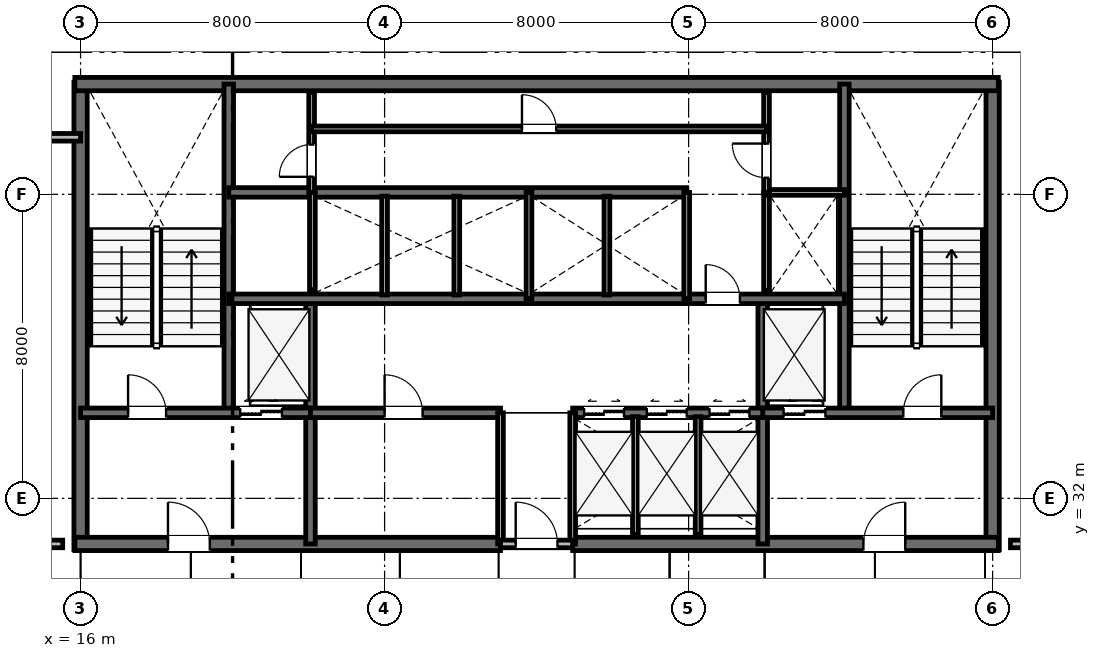
"""IFC4 building model, lengths in metres.
Left out: names, types, materials, properties, quantities, classifications, styles, units other than length and angle.
Written with IfcOpenShell. Run it as: python <this file> out.ifc"""

import sys

from ifc_helpers import new_model, si_unit, direction, frame, frame_2d, origin, place, context, subcontext, project, spatial, rectangle, extrude, element, fill, save


model = new_model("IFC4")
c1 = context("Model", 3, precision=1e-05, world=origin(), true_north=direction((0.0, 1.0)))
c2 = subcontext(c1, "Body", "Model", "MODEL_VIEW")
j1 = project(units=[si_unit("LENGTHUNIT", "METRE"), si_unit("PLANEANGLEUNIT", "RADIAN")], contexts=[c1])
p1 = place(None, origin())
s1 = spatial("IfcSite", under=j1, at=p1, CompositionType="ELEMENT")
p2 = place(p1, origin())
s2 = spatial("IfcBuilding", under=s1, at=p2, CompositionType="ELEMENT")
p3 = place(p2, frame((0.0, 0.0, 122.4)))
s3 = spatial("IfcBuildingStorey", under=s2, at=p3, CompositionType="ELEMENT", Elevation=122.4)
for number, where, z_axis, x_axis in (
    (1, (16.0, 30.65, 0.0), (0.0, 0.0, 1.0), (0.0, 1.0, 0.0)),
    (2, (40.0, 30.65, 0.0), (0.0, 0.0, 1.0), (0.0, 1.0, 0.0)),
):
    element("IfcWall", number, at=place(p3, frame(where, z_axis=z_axis, x_axis=x_axis)), inside=s3, PredefinedType="SHEAR", context=c2, shape_type="SweptSolid", body=[
        extrude(rectangle(XDim=12.3, YDim=0.35, at=frame_2d((6.15, 0.0))), origin(), (0.0, 0.0, 1.0), 3.6),
    ])
p4 = place(p3, frame((15.85, 42.9, 0.0), z_axis=(0.0, 0.0, 1.0), x_axis=(1.0, 0.0, 0.0)))
e3 = element("IfcWall", 3, at=p4, inside=s3, PredefinedType="SHEAR", context=c2, shape_type="SweptSolid", body=[
    extrude(rectangle(XDim=24.3, YDim=0.35, at=frame_2d((12.15, 0.0))), origin(), (0.0, 0.0, 1.0), 3.6),
])
p5 = place(p3, frame((15.85, 30.8, 0.0), z_axis=(0.0, 0.0, 1.0), x_axis=(1.0, 0.0, 0.0)))
e4 = element("IfcWall", 4, at=p5, inside=s3, PredefinedType="SHEAR", context=c2, shape_type="SweptSolid", body=[
    extrude(rectangle(XDim=11.2, YDim=0.35, at=frame_2d((5.6, 0.0))), origin(), (0.0, 0.0, 1.0), 3.6),
])
p6 = place(p5, frame((2.45, 0.0, 0.0)))
e5 = element("IfcOpeningElement", 5, at=p6, cuts=e4, PredefinedType="OPENING", context=c2, shape_type="SweptSolid", body=[
    extrude(rectangle(XDim=1.1, YDim=2.15, at=frame_2d((0.55, 1.075))), frame((0.0, 0.185, 0.0), z_axis=(0.0, -1.0, 0.0), x_axis=(1.0, 0.0, 0.0)), (0.0, 0.0, 1.0), 0.37),
])
p7 = place(p3, frame((28.95, 30.8, 0.0), z_axis=(0.0, 0.0, 1.0), x_axis=(1.0, 0.0, 0.0)))
e6 = element("IfcWall", 6, at=p7, inside=s3, PredefinedType="SHEAR", context=c2, shape_type="SweptSolid", body=[
    extrude(rectangle(XDim=11.2, YDim=0.35, at=frame_2d((5.6, 0.0))), origin(), (0.0, 0.0, 1.0), 3.6),
])
p8 = place(p7, frame((7.65, 0.0, 0.0)))
e7 = element("IfcOpeningElement", 7, at=p8, cuts=e6, PredefinedType="OPENING", context=c2, shape_type="SweptSolid", body=[
    extrude(rectangle(XDim=1.1, YDim=2.15, at=frame_2d((0.55, 1.075))), frame((0.0, 0.185, 0.0), z_axis=(0.0, -1.0, 0.0), x_axis=(1.0, 0.0, 0.0)), (0.0, 0.0, 1.0), 0.37),
])
for number, where, z_axis, x_axis in (
    (8, (19.9, 34.25, 0.0), (0.0, 0.0, 1.0), (0.0, 1.0, 0.0)),
    (9, (36.1, 34.25, 0.0), (0.0, 0.0, 1.0), (0.0, 1.0, 0.0)),
):
    element("IfcWall", number, at=place(p3, frame(where, z_axis=z_axis, x_axis=x_axis)), inside=s3, PredefinedType="SHEAR", context=c2, shape_type="SweptSolid", body=[
        extrude(rectangle(XDim=8.65, YDim=0.25, at=frame_2d((4.325, 0.0))), origin(), (0.0, 0.0, 1.0), 3.6),
    ])
for number, where, z_axis, x_axis in (
    (10, (22.05, 30.8, 0.0), (0.0, 0.0, 1.0), (0.0, 1.0, 0.0)),
    (11, (33.95, 30.8, 0.0), (0.0, 0.0, 1.0), (0.0, 1.0, 0.0)),
):
    element("IfcWall", number, at=place(p3, frame(where, z_axis=z_axis, x_axis=x_axis)), inside=s3, PredefinedType="SHEAR", context=c2, shape_type="SweptSolid", body=[
        extrude(rectangle(XDim=6.45, YDim=0.25, at=frame_2d((3.225, 0.0))), origin(), (0.0, 0.0, 1.0), 3.6),
    ])
p9 = place(p3, frame((16.0, 34.25, 0.0), z_axis=(0.0, 0.0, 1.0), x_axis=(1.0, 0.0, 0.0)))
e12 = element("IfcWall", 12, at=p9, inside=s3, PredefinedType="SHEAR", context=c2, shape_type="SweptSolid", body=[
    extrude(rectangle(XDim=6.05, YDim=0.25, at=frame_2d((3.025, 0.0))), origin(), (0.0, 0.0, 1.0), 3.6),
])
p10 = place(p9, frame((1.25, 0.0, 0.0)))
e13 = element("IfcOpeningElement", 13, at=p10, cuts=e12, PredefinedType="OPENING", context=c2, shape_type="SweptSolid", body=[
    extrude(rectangle(XDim=1.0, YDim=2.15, at=frame_2d((0.5, 1.075))), frame((0.0, 0.135, 0.0), z_axis=(0.0, -1.0, 0.0), x_axis=(1.0, 0.0, 0.0)), (0.0, 0.0, 1.0), 0.27),
])
p11 = place(p9, frame((4.2, 0.0, 0.0)))
e14 = element("IfcOpeningElement", 14, at=p11, cuts=e12, PredefinedType="OPENING", context=c2, shape_type="SweptSolid", body=[
    extrude(rectangle(XDim=1.1, YDim=2.15, at=frame_2d((0.55, 1.075))), frame((0.0, 0.135, 0.0), z_axis=(0.0, -1.0, 0.0), x_axis=(1.0, 0.0, 0.0)), (0.0, 0.0, 1.0), 0.27),
])
p12 = place(p3, frame((33.95, 34.25, 0.0), z_axis=(0.0, 0.0, 1.0), x_axis=(1.0, 0.0, 0.0)))
e15 = element("IfcWall", 15, at=p12, inside=s3, PredefinedType="SHEAR", context=c2, shape_type="SweptSolid", body=[
    extrude(rectangle(XDim=6.05, YDim=0.25, at=frame_2d((3.025, 0.0))), origin(), (0.0, 0.0, 1.0), 3.6),
])
p13 = place(p12, frame((3.7, 0.0, 0.0)))
e16 = element("IfcOpeningElement", 16, at=p13, cuts=e15, PredefinedType="OPENING", context=c2, shape_type="SweptSolid", body=[
    extrude(rectangle(XDim=1.0, YDim=2.15, at=frame_2d((0.5, 1.075))), frame((0.0, 0.135, 0.0), z_axis=(0.0, -1.0, 0.0), x_axis=(1.0, 0.0, 0.0)), (0.0, 0.0, 1.0), 0.27),
])
p14 = place(p12, frame((0.55, 0.0, 0.0)))
e17 = element("IfcOpeningElement", 17, at=p14, cuts=e15, PredefinedType="OPENING", context=c2, shape_type="SweptSolid", body=[
    extrude(rectangle(XDim=1.1, YDim=2.15, at=frame_2d((0.55, 1.075))), frame((0.0, 0.135, 0.0), z_axis=(0.0, -1.0, 0.0), x_axis=(1.0, 0.0, 0.0)), (0.0, 0.0, 1.0), 0.27),
])
p15 = place(p3, frame((22.05, 34.25, 0.0), z_axis=(0.0, 0.0, 1.0), x_axis=(1.0, 0.0, 0.0)))
e18 = element("IfcWall", 18, at=p15, inside=s3, PredefinedType="SHEAR", context=c2, shape_type="SweptSolid", body=[
    extrude(rectangle(XDim=5.0, YDim=0.25, at=frame_2d((2.5, 0.0))), origin(), (0.0, 0.0, 1.0), 3.6),
])
p16 = place(p15, frame((1.95, 0.0, 0.0)))
e19 = element("IfcOpeningElement", 19, at=p16, cuts=e18, PredefinedType="OPENING", context=c2, shape_type="SweptSolid", body=[
    extrude(rectangle(XDim=1.0, YDim=2.15, at=frame_2d((0.5, 1.075))), frame((0.0, 0.135, 0.0), z_axis=(0.0, -1.0, 0.0), x_axis=(1.0, 0.0, 0.0)), (0.0, 0.0, 1.0), 0.27),
])
p17 = place(p3, frame((28.95, 34.25, 0.0), z_axis=(0.0, 0.0, 1.0), x_axis=(1.0, 0.0, 0.0)))
e20 = element("IfcWall", 20, at=p17, inside=s3, PredefinedType="SHEAR", context=c2, shape_type="SweptSolid", body=[
    extrude(rectangle(XDim=5.0, YDim=0.25, at=frame_2d((2.5, 0.0))), origin(), (0.0, 0.0, 1.0), 3.6),
])
p18 = place(p17, frame((0.3, 0.0, 0.0)))
e21 = element("IfcOpeningElement", 21, at=p18, cuts=e20, PredefinedType="OPENING", context=c2, shape_type="SweptSolid", body=[
    extrude(rectangle(XDim=1.05, YDim=2.15, at=frame_2d((0.525, 1.075))), frame((0.0, 0.135, 0.0), z_axis=(0.0, -1.0, 0.0), x_axis=(1.0, 0.0, 0.0)), (0.0, 0.0, 1.0), 0.27),
])
p19 = place(p17, frame((1.95, 0.0, 0.0)))
e22 = element("IfcOpeningElement", 22, at=p19, cuts=e20, PredefinedType="OPENING", context=c2, shape_type="SweptSolid", body=[
    extrude(rectangle(XDim=1.05, YDim=2.15, at=frame_2d((0.525, 1.075))), frame((0.0, 0.135, 0.0), z_axis=(0.0, -1.0, 0.0), x_axis=(1.0, 0.0, 0.0)), (0.0, 0.0, 1.0), 0.27),
])
p20 = place(p17, frame((3.6, 0.0, 0.0)))
e23 = element("IfcOpeningElement", 23, at=p20, cuts=e20, PredefinedType="OPENING", context=c2, shape_type="SweptSolid", body=[
    extrude(rectangle(XDim=1.05, YDim=2.15, at=frame_2d((0.525, 1.075))), frame((0.0, 0.135, 0.0), z_axis=(0.0, -1.0, 0.0), x_axis=(1.0, 0.0, 0.0)), (0.0, 0.0, 1.0), 0.27),
])
p21 = place(p3, frame((19.9, 37.25, 0.0), z_axis=(0.0, 0.0, 1.0), x_axis=(1.0, 0.0, 0.0)))
e24 = element("IfcWall", 24, at=p21, inside=s3, PredefinedType="SHEAR", context=c2, shape_type="SweptSolid", body=[
    extrude(rectangle(XDim=16.2, YDim=0.25, at=frame_2d((8.1, 0.0))), origin(), (0.0, 0.0, 1.0), 3.6),
])
p22 = place(p21, frame((12.55, 0.0, 0.0)))
e25 = element("IfcOpeningElement", 25, at=p22, cuts=e24, PredefinedType="OPENING", context=c2, shape_type="SweptSolid", body=[
    extrude(rectangle(XDim=0.9, YDim=2.15, at=frame_2d((0.45, 1.075))), frame((0.0, 0.135, 0.0), z_axis=(0.0, -1.0, 0.0), x_axis=(1.0, 0.0, 0.0)), (0.0, 0.0, 1.0), 0.27),
])
p23 = place(p3, frame((19.9, 40.05, 0.0), z_axis=(0.0, 0.0, 1.0), x_axis=(1.0, 0.0, 0.0)))
e26 = element("IfcWall", 26, at=p23, inside=s3, PredefinedType="SHEAR", context=c2, shape_type="SweptSolid", body=[
    extrude(rectangle(XDim=12.05, YDim=0.25, at=frame_2d((6.025, 0.0))), origin(), (0.0, 0.0, 1.0), 3.6),
])
p24 = place(p3, frame((27.05, 30.8, 0.0), z_axis=(0.0, 0.0, 1.0), x_axis=(0.0, 1.0, 0.0)))
e27 = element("IfcWall", 27, at=p24, inside=s3, PredefinedType="PLUMBINGWALL", context=c2, shape_type="SweptSolid", body=[
    extrude(rectangle(XDim=3.45, YDim=0.15, at=frame_2d((1.725, 0.0))), origin(), (0.0, 0.0, 1.0), 3.01),
])
p25 = place(p3, frame((28.95, 30.8, 0.0), z_axis=(0.0, 0.0, 1.0), x_axis=(0.0, 1.0, 0.0)))
e28 = element("IfcWall", 28, at=p25, inside=s3, PredefinedType="PLUMBINGWALL", context=c2, shape_type="SweptSolid", body=[
    extrude(rectangle(XDim=3.45, YDim=0.15, at=frame_2d((1.725, 0.0))), origin(), (0.0, 0.0, 1.0), 3.33),
])
p26 = place(p3, frame((27.05, 30.8, 0.0), z_axis=(0.0, 0.0, 1.0), x_axis=(1.0, 0.0, 0.0)))
e29 = element("IfcWall", 29, at=p26, inside=s3, PredefinedType="PARTITIONING", context=c2, shape_type="SweptSolid", body=[
    extrude(rectangle(XDim=1.9, YDim=0.2, at=frame_2d((0.95, 0.0))), origin(), (0.0, 0.0, 1.0), 3.01),
])
p27 = place(p26, frame((0.4, 0.0, 0.0)))
e30 = element("IfcOpeningElement", 30, at=p27, cuts=e29, PredefinedType="OPENING", context=c2, shape_type="SweptSolid", body=[
    extrude(rectangle(XDim=1.1, YDim=2.15, at=frame_2d((0.55, 1.075))), frame((0.0, 0.11, 0.0), z_axis=(0.0, -1.0, 0.0), x_axis=(1.0, 0.0, 0.0)), (0.0, 0.0, 1.0), 0.22),
])
for number, where, z_axis, x_axis in (
    (31, (30.6, 31.05, 0.0), (0.0, 0.0, 1.0), (0.0, 1.0, 0.0)),
    (32, (32.25, 31.05, 0.0), (0.0, 0.0, 1.0), (0.0, 1.0, 0.0)),
):
    element("IfcWall", number, at=place(p3, frame(where, z_axis=z_axis, x_axis=x_axis)), inside=s3, PredefinedType="PLUMBINGWALL", context=c2, shape_type="SweptSolid", body=[
        extrude(rectangle(XDim=3.1, YDim=0.15, at=frame_2d((1.55, 0.0))), origin(), (0.0, 0.0, 1.0), 3.33),
    ])
p28 = place(p3, frame((22.1, 37.49, 0.0), z_axis=(0.0, 0.0, 1.0), x_axis=(0.0, 1.0, 0.0)))
e33 = element("IfcWall", 33, at=p28, inside=s3, PredefinedType="PLUMBINGWALL", context=c2, shape_type="SweptSolid", body=[
    extrude(rectangle(XDim=2.56, YDim=0.15, at=frame_2d((1.28, 0.0))), origin(), (0.0, 0.0, 1.0), 3.33),
])
p29 = place(p3, frame((27.8, 37.25, 0.0), z_axis=(0.0, 0.0, 1.0), x_axis=(0.0, 1.0, 0.0)))
e34 = element("IfcWall", 34, at=p29, inside=s3, PredefinedType="PLUMBINGWALL", context=c2, shape_type="SweptSolid", body=[
    extrude(rectangle(XDim=2.8, YDim=0.15, at=frame_2d((1.4, 0.0))), origin(), (0.0, 0.0, 1.0), 3.33),
])
for number, where, z_axis, x_axis in (
    (35, (24.0, 37.35, 0.0), (0.0, 0.0, 1.0), (0.0, 1.0, 0.0)),
    (36, (25.9, 37.35, 0.0), (0.0, 0.0, 1.0), (0.0, 1.0, 0.0)),
):
    element("IfcWall", number, at=place(p3, frame(where, z_axis=z_axis, x_axis=x_axis)), inside=s3, PredefinedType="PLUMBINGWALL", context=c2, shape_type="SweptSolid", body=[
        extrude(rectangle(XDim=2.6, YDim=0.15, at=frame_2d((1.3, 0.0))), origin(), (0.0, 0.0, 1.0), 3.33),
    ])
p30 = place(p3, frame((31.95, 37.25, 0.0), z_axis=(0.0, 0.0, 1.0), x_axis=(0.0, 1.0, 0.0)))
e37 = element("IfcWall", 37, at=p30, inside=s3, PredefinedType="PLUMBINGWALL", context=c2, shape_type="SweptSolid", body=[
    extrude(rectangle(XDim=2.8, YDim=0.15, at=frame_2d((1.4, 0.0))), origin(), (0.0, 0.0, 1.0), 3.33),
])
p31 = place(p3, frame((29.85, 37.35, 0.0), z_axis=(0.0, 0.0, 1.0), x_axis=(0.0, 1.0, 0.0)))
e38 = element("IfcWall", 38, at=p31, inside=s3, PredefinedType="PLUMBINGWALL", context=c2, shape_type="SweptSolid", body=[
    extrude(rectangle(XDim=2.6, YDim=0.15, at=frame_2d((1.3, 0.0))), origin(), (0.0, 0.0, 1.0), 3.33),
])
p32 = place(p3, frame((34.05, 37.473, 0.0), z_axis=(0.0, 0.0, 1.0), x_axis=(0.0, 1.0, 0.0)))
e39 = element("IfcWall", 39, at=p32, inside=s3, PredefinedType="PLUMBINGWALL", context=c2, shape_type="SweptSolid", body=[
    extrude(rectangle(XDim=2.577, YDim=0.15, at=frame_2d((1.288, 0.0))), origin(), (0.0, 0.0, 1.0), 3.33),
])
p33 = place(p3, frame((34.05, 40.05, 0.0), z_axis=(0.0, 0.0, 1.0), x_axis=(1.0, 0.0, 0.0)))
e40 = element("IfcWall", 40, at=p33, inside=s3, PredefinedType="PARTITIONING", context=c2, shape_type="SweptSolid", body=[
    extrude(rectangle(XDim=2.05, YDim=0.15, at=frame_2d((1.025, 0.0))), origin(), (0.0, 0.0, 1.0), 3.33),
])
p34 = place(p3, frame((34.05, 40.05, 0.0), z_axis=(0.0, 0.0, 1.0), x_axis=(0.0, 1.0, 0.0)))
e41 = element("IfcWall", 41, at=p34, inside=s3, PredefinedType="PARTITIONING", context=c2, shape_type="SweptSolid", body=[
    extrude(rectangle(XDim=2.63, YDim=0.15, at=frame_2d((1.315, 0.0))), origin(), (0.0, 0.0, 1.0), 3.33),
])
p35 = place(p34, frame((0.385, 0.0, 0.0)))
e42 = element("IfcOpeningElement", 42, at=p35, cuts=e41, PredefinedType="OPENING", context=c2, shape_type="SweptSolid", body=[
    extrude(rectangle(XDim=0.9, YDim=2.15, at=frame_2d((0.45, 1.075))), frame((0.0, 0.085, 0.0), z_axis=(0.0, -1.0, 0.0), x_axis=(1.0, 0.0, 0.0)), (0.0, 0.0, 1.0), 0.17),
])
p36 = place(p3, frame((22.08, 40.05, 0.0), z_axis=(0.0, 0.0, 1.0), x_axis=(0.0, 1.0, 0.0)))
e43 = element("IfcWall", 43, at=p36, inside=s3, PredefinedType="PARTITIONING", context=c2, shape_type="SweptSolid", body=[
    extrude(rectangle(XDim=2.63, YDim=0.15, at=frame_2d((1.315, 0.0))), origin(), (0.0, 0.0, 1.0), 3.33),
])
p37 = place(p36, frame((0.41, 0.0, 0.0)))
e44 = element("IfcOpeningElement", 44, at=p37, cuts=e43, PredefinedType="OPENING", context=c2, shape_type="SweptSolid", body=[
    extrude(rectangle(XDim=0.85, YDim=2.15, at=frame_2d((0.425, 1.075))), frame((0.0, 0.085, 0.0), z_axis=(0.0, -1.0, 0.0), x_axis=(1.0, 0.0, 0.0)), (0.0, 0.0, 1.0), 0.17),
])
p38 = place(p3, frame((22.08, 41.72, 0.0), z_axis=(0.0, 0.0, 1.0), x_axis=(1.0, 0.0, 0.0)))
e45 = element("IfcWall", 45, at=p38, inside=s3, PredefinedType="PARTITIONING", context=c2, shape_type="SweptSolid", body=[
    extrude(rectangle(XDim=11.97, YDim=0.15, at=frame_2d((5.985, 0.0))), origin(), (0.0, 0.0, 1.0), 3.33),
])
p39 = place(p38, frame((5.535, 0.0, 0.0)))
e46 = element("IfcOpeningElement", 46, at=p39, cuts=e45, PredefinedType="OPENING", context=c2, shape_type="SweptSolid", body=[
    extrude(rectangle(XDim=0.9, YDim=2.15, at=frame_2d((0.45, 1.075))), frame((0.0, 0.085, 0.0), z_axis=(0.0, -1.0, 0.0), x_axis=(1.0, 0.0, 0.0)), (0.0, 0.0, 1.0), 0.17),
])
p40 = place(p3, frame((11.4, 30.8, 0.0), z_axis=(0.0, 0.0, 1.0), x_axis=(1.0, 0.0, 0.0)))
e47 = element("IfcWall", 47, at=p40, inside=s3, PredefinedType="PARTITIONING", context=c2, shape_type="SweptSolid", body=[
    extrude(rectangle(XDim=4.13, YDim=0.2, at=frame_2d((2.065, 0.0))), origin(), (0.0, 0.0, 1.0), 2.87),
])
p41 = place(p3, frame((40.47, 30.8, 0.0), z_axis=(0.0, 0.0, 1.0), x_axis=(1.0, 0.0, 0.0)))
e48 = element("IfcWall", 48, at=p41, inside=s3, PredefinedType="PARTITIONING", context=c2, shape_type="SweptSolid", body=[
    extrude(rectangle(XDim=1.73, YDim=0.2, at=frame_2d((0.865, 0.0))), origin(), (0.0, 0.0, 1.0), 2.87),
])
p42 = place(p3, frame((0.1, 41.5, 0.0), z_axis=(0.0, 0.0, 1.0), x_axis=(1.0, 0.0, 0.0)))
e49 = element("IfcWall", 49, at=p42, inside=s3, PredefinedType="PARTITIONING", context=c2, shape_type="SweptSolid", body=[
    extrude(rectangle(XDim=15.9, YDim=0.2, at=frame_2d((7.95, 0.0))), origin(), (0.0, 0.0, 1.0), 2.87),
])
p43 = place(p42, frame((9.877, 0.0, 0.0)))
e50 = element("IfcOpeningElement", 50, at=p43, cuts=e49, PredefinedType="OPENING", context=c2, shape_type="SweptSolid", body=[
    extrude(rectangle(XDim=0.95, YDim=2.15, at=frame_2d((0.475, 1.075))), frame((0.0, 0.11, 0.0), z_axis=(0.0, -1.0, 0.0), x_axis=(1.0, 0.0, 0.0)), (0.0, 0.0, 1.0), 0.22),
])
p44 = place(p27, origin())
e51 = element("IfcDoor", 51, at=p44, inside=s3, OperationType="SINGLE_SWING_LEFT", PredefinedType="DOOR", context=c2, shape_type="SweptSolid", body=[
    extrude(rectangle(XDim=1.1, YDim=2.15, at=frame_2d((0.55, 1.075))), frame((0.0, 0.025, 0.0), z_axis=(0.0, -1.0, 0.0), x_axis=(1.0, 0.0, 0.0)), (0.0, 0.0, 1.0), 0.05),
])
fill(e30, e51)
p45 = place(p10, origin())
e52 = element("IfcDoor", 52, at=p45, inside=s3, OperationType="SINGLE_SWING_LEFT", PredefinedType="DOOR", context=c2, shape_type="SweptSolid", body=[
    extrude(rectangle(XDim=1.0, YDim=2.15, at=frame_2d((0.5, 1.075))), frame((0.0, 0.025, 0.0), z_axis=(0.0, -1.0, 0.0), x_axis=(1.0, 0.0, 0.0)), (0.0, 0.0, 1.0), 0.05),
])
fill(e13, e52)
p46 = place(p13, origin())
e53 = element("IfcDoor", 53, at=p46, inside=s3, OperationType="SINGLE_SWING_RIGHT", PredefinedType="DOOR", context=c2, shape_type="SweptSolid", body=[
    extrude(rectangle(XDim=1.0, YDim=2.15, at=frame_2d((0.5, 1.075))), frame((0.0, 0.025, 0.0), z_axis=(0.0, -1.0, 0.0), x_axis=(1.0, 0.0, 0.0)), (0.0, 0.0, 1.0), 0.05),
])
fill(e16, e53)
p47 = place(p6, origin())
e54 = element("IfcDoor", 54, at=p47, inside=s3, OperationType="SINGLE_SWING_LEFT", PredefinedType="DOOR", context=c2, shape_type="SweptSolid", body=[
    extrude(rectangle(XDim=1.1, YDim=2.15, at=frame_2d((0.55, 1.075))), frame((0.0, 0.025, 0.0), z_axis=(0.0, -1.0, 0.0), x_axis=(1.0, 0.0, 0.0)), (0.0, 0.0, 1.0), 0.05),
])
fill(e5, e54)
p48 = place(p8, origin())
e55 = element("IfcDoor", 55, at=p48, inside=s3, OperationType="SINGLE_SWING_RIGHT", PredefinedType="DOOR", context=c2, shape_type="SweptSolid", body=[
    extrude(rectangle(XDim=1.1, YDim=2.15, at=frame_2d((0.55, 1.075))), frame((0.0, 0.025, 0.0), z_axis=(0.0, -1.0, 0.0), x_axis=(1.0, 0.0, 0.0)), (0.0, 0.0, 1.0), 0.05),
])
fill(e7, e55)
p49 = place(p16, origin())
e56 = element("IfcDoor", 56, at=p49, inside=s3, OperationType="SINGLE_SWING_LEFT", PredefinedType="DOOR", context=c2, shape_type="SweptSolid", body=[
    extrude(rectangle(XDim=1.0, YDim=2.15, at=frame_2d((0.5, 1.075))), frame((0.0, 0.025, 0.0), z_axis=(0.0, -1.0, 0.0), x_axis=(1.0, 0.0, 0.0)), (0.0, 0.0, 1.0), 0.05),
])
fill(e19, e56)
p50 = place(p22, origin())
e57 = element("IfcDoor", 57, at=p50, inside=s3, OperationType="SINGLE_SWING_LEFT", PredefinedType="DOOR", context=c2, shape_type="SweptSolid", body=[
    extrude(rectangle(XDim=0.9, YDim=2.15, at=frame_2d((0.45, 1.075))), frame((0.0, 0.025, 0.0), z_axis=(0.0, -1.0, 0.0), x_axis=(1.0, 0.0, 0.0)), (0.0, 0.0, 1.0), 0.05),
])
fill(e25, e57)
p51 = place(p35, origin())
e58 = element("IfcDoor", 58, at=p51, inside=s3, OperationType="SINGLE_SWING_RIGHT", PredefinedType="DOOR", context=c2, shape_type="SweptSolid", body=[
    extrude(rectangle(XDim=0.9, YDim=2.15, at=frame_2d((0.45, 1.075))), frame((0.0, 0.025, 0.0), z_axis=(0.0, -1.0, 0.0), x_axis=(1.0, 0.0, 0.0)), (0.0, 0.0, 1.0), 0.05),
])
fill(e42, e58)
p52 = place(p37, origin())
e59 = element("IfcDoor", 59, at=p52, inside=s3, OperationType="SINGLE_SWING_LEFT", PredefinedType="DOOR", context=c2, shape_type="SweptSolid", body=[
    extrude(rectangle(XDim=0.85, YDim=2.15, at=frame_2d((0.425, 1.075))), frame((0.0, 0.025, 0.0), z_axis=(0.0, -1.0, 0.0), x_axis=(1.0, 0.0, 0.0)), (0.0, 0.0, 1.0), 0.05),
])
fill(e44, e59)
p53 = place(p39, origin())
e60 = element("IfcDoor", 60, at=p53, inside=s3, OperationType="SINGLE_SWING_LEFT", PredefinedType="DOOR", context=c2, shape_type="SweptSolid", body=[
    extrude(rectangle(XDim=0.9, YDim=2.15, at=frame_2d((0.45, 1.075))), frame((0.0, 0.025, 0.0), z_axis=(0.0, -1.0, 0.0), x_axis=(1.0, 0.0, 0.0)), (0.0, 0.0, 1.0), 0.05),
])
fill(e46, e60)
p54 = place(p11, origin())
e61 = element("IfcDoor", 61, at=p54, inside=s3, OperationType="DOUBLE_DOOR_SLIDING", PredefinedType="DOOR", context=c2, shape_type="SweptSolid", body=[
    extrude(rectangle(XDim=1.1, YDim=2.15, at=frame_2d((0.55, 1.075))), frame((0.0, 0.025, 0.0), z_axis=(0.0, -1.0, 0.0), x_axis=(1.0, 0.0, 0.0)), (0.0, 0.0, 1.0), 0.05),
])
fill(e14, e61)
p55 = place(p14, origin())
e62 = element("IfcDoor", 62, at=p55, inside=s3, OperationType="DOUBLE_DOOR_SLIDING", PredefinedType="DOOR", context=c2, shape_type="SweptSolid", body=[
    extrude(rectangle(XDim=1.1, YDim=2.15, at=frame_2d((0.55, 1.075))), frame((0.0, 0.025, 0.0), z_axis=(0.0, -1.0, 0.0), x_axis=(1.0, 0.0, 0.0)), (0.0, 0.0, 1.0), 0.05),
])
fill(e17, e62)
p56 = place(p18, origin())
e63 = element("IfcDoor", 63, at=p56, inside=s3, OperationType="DOUBLE_DOOR_SLIDING", PredefinedType="DOOR", context=c2, shape_type="SweptSolid", body=[
    extrude(rectangle(XDim=1.05, YDim=2.15, at=frame_2d((0.525, 1.075))), frame((0.0, 0.025, 0.0), z_axis=(0.0, -1.0, 0.0), x_axis=(1.0, 0.0, 0.0)), (0.0, 0.0, 1.0), 0.05),
])
fill(e21, e63)
p57 = place(p19, origin())
e64 = element("IfcDoor", 64, at=p57, inside=s3, OperationType="DOUBLE_DOOR_SLIDING", PredefinedType="DOOR", context=c2, shape_type="SweptSolid", body=[
    extrude(rectangle(XDim=1.05, YDim=2.15, at=frame_2d((0.525, 1.075))), frame((0.0, 0.025, 0.0), z_axis=(0.0, -1.0, 0.0), x_axis=(1.0, 0.0, 0.0)), (0.0, 0.0, 1.0), 0.05),
])
fill(e22, e64)
p58 = place(p20, origin())
e65 = element("IfcDoor", 65, at=p58, inside=s3, OperationType="DOUBLE_DOOR_SLIDING", PredefinedType="DOOR", context=c2, shape_type="SweptSolid", body=[
    extrude(rectangle(XDim=1.05, YDim=2.15, at=frame_2d((0.525, 1.075))), frame((0.0, 0.025, 0.0), z_axis=(0.0, -1.0, 0.0), x_axis=(1.0, 0.0, 0.0)), (0.0, 0.0, 1.0), 0.05),
])
fill(e23, e65)
save(model, sys.argv[1])
